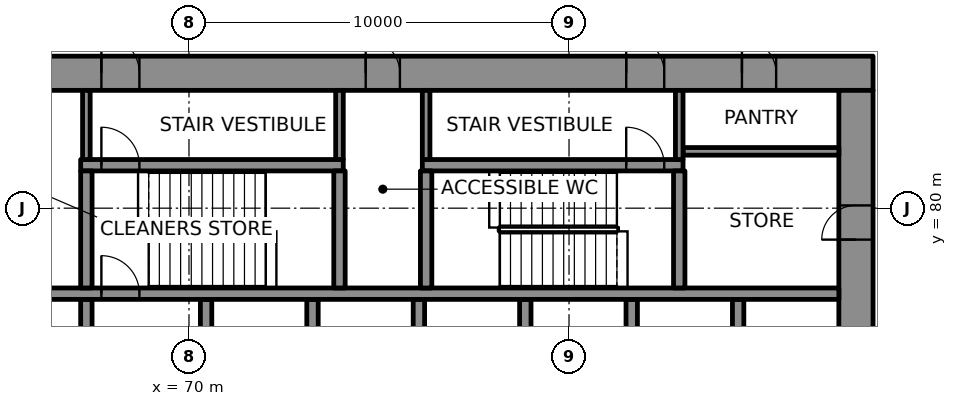
"""IFC4 building model, lengths in metres.
Left out: names, types, materials, properties, quantities, classifications, styles, units other than length and angle.
Written with IfcOpenShell. Run it as: python <this file> out.ifc"""

import sys

from ifc_helpers import new_model, si_unit, direction, frame, frame_2d, origin, place, context, subcontext, project, spatial, rectangle, extrude, element, fill, save


model = new_model("IFC4")
c1 = context("Model", 3, precision=1e-05, world=origin(), true_north=direction((0.0, 1.0)))
c2 = subcontext(c1, "Body", "Model", "MODEL_VIEW")
j1 = project(units=[si_unit("LENGTHUNIT", "METRE"), si_unit("PLANEANGLEUNIT", "RADIAN")], contexts=[c1])
p1 = place(None, origin())
s1 = spatial("IfcSite", under=j1, at=p1, CompositionType="ELEMENT")
p2 = place(p1, origin())
s2 = spatial("IfcBuilding", under=s1, at=p2, CompositionType="ELEMENT")
p3 = place(p2, frame((0.0, 0.0, 65.2)))
s3 = spatial("IfcBuildingStorey", under=s2, at=p3, CompositionType="ELEMENT", Elevation=65.2)
p4 = place(p3, frame((62.0, 83.55, 0.0), z_axis=(0.0, 0.0, 1.0), x_axis=(1.0, 0.0, 0.0)))
e1 = element("IfcWall", 1, at=p4, inside=s3, PredefinedType="SHEAR", context=c2, shape_type="SweptSolid", body=[
    extrude(rectangle(XDim=26.0, YDim=0.9, at=frame_2d((13.0, 0.0))), origin(), (0.0, 0.0, 1.0), 4.0),
])
p5 = place(p4, frame((5.695, 0.0, 0.0)))
e2 = element("IfcOpeningElement", 2, at=p5, cuts=e1, PredefinedType="OPENING", context=c2, shape_type="SweptSolid", body=[
    extrude(rectangle(XDim=1.0, YDim=2.1, at=frame_2d((0.5, 1.05))), frame((0.0, 0.46, 0.0), z_axis=(0.0, -1.0, 0.0), x_axis=(1.0, 0.0, 0.0)), (0.0, 0.0, 1.0), 0.92),
])
p6 = place(p4, frame((19.505, 0.0, 0.0)))
e3 = element("IfcOpeningElement", 3, at=p6, cuts=e1, PredefinedType="OPENING", context=c2, shape_type="SweptSolid", body=[
    extrude(rectangle(XDim=1.0, YDim=2.1, at=frame_2d((0.5, 1.05))), frame((0.0, 0.46, 0.0), z_axis=(0.0, -1.0, 0.0), x_axis=(1.0, 0.0, 0.0)), (0.0, 0.0, 1.0), 0.92),
])
p7 = place(p4, frame((3.45, 0.0, 0.0)))
e4 = element("IfcOpeningElement", 4, at=p7, cuts=e1, PredefinedType="OPENING", context=c2, shape_type="SweptSolid", body=[
    extrude(rectangle(XDim=0.9, YDim=2.1, at=frame_2d((0.45, 1.05))), frame((0.0, 0.46, 0.0), z_axis=(0.0, -1.0, 0.0), x_axis=(1.0, 0.0, 0.0)), (0.0, 0.0, 1.0), 0.92),
])
p8 = place(p4, frame((12.65, 0.0, 0.0)))
e5 = element("IfcOpeningElement", 5, at=p8, cuts=e1, PredefinedType="OPENING", context=c2, shape_type="SweptSolid", body=[
    extrude(rectangle(XDim=0.9, YDim=2.1, at=frame_2d((0.45, 1.05))), frame((0.0, 0.46, 0.0), z_axis=(0.0, -1.0, 0.0), x_axis=(1.0, 0.0, 0.0)), (0.0, 0.0, 1.0), 0.92),
])
p9 = place(p4, frame((22.55, 0.0, 0.0)))
e6 = element("IfcOpeningElement", 6, at=p9, cuts=e1, PredefinedType="OPENING", context=c2, shape_type="SweptSolid", body=[
    extrude(rectangle(XDim=0.9, YDim=2.1, at=frame_2d((0.45, 1.05))), frame((0.0, 0.46, 0.0), z_axis=(0.0, -1.0, 0.0), x_axis=(1.0, 0.0, 0.0)), (0.0, 0.0, 1.0), 0.92),
])
p10 = place(p3, frame((87.55, 66.9, 0.0), z_axis=(0.0, 0.0, 1.0), x_axis=(0.0, 1.0, 0.0)))
e7 = element("IfcWall", 7, at=p10, inside=s3, PredefinedType="SHEAR", context=c2, shape_type="SweptSolid", body=[
    extrude(rectangle(XDim=16.2, YDim=0.9, at=frame_2d((8.1, 0.0))), origin(), (0.0, 0.0, 1.0), 4.0),
])
p11 = place(p10, frame((5.5, 0.0, 0.0)))
e8 = element("IfcOpeningElement", 8, at=p11, cuts=e7, PredefinedType="OPENING", context=c2, shape_type="SweptSolid", body=[
    extrude(rectangle(XDim=1.8, YDim=2.1, at=frame_2d((0.9, 1.05))), frame((0.0, 0.46, 0.0), z_axis=(0.0, -1.0, 0.0), x_axis=(1.0, 0.0, 0.0)), (0.0, 0.0, 1.0), 0.92),
])
p12 = place(p10, frame((12.272, 0.0, 0.0)))
e9 = element("IfcOpeningElement", 9, at=p12, cuts=e7, PredefinedType="OPENING", context=c2, shape_type="SweptSolid", body=[
    extrude(rectangle(XDim=0.9, YDim=2.1, at=frame_2d((0.45, 1.05))), frame((0.0, 0.46, 0.0), z_axis=(0.0, -1.0, 0.0), x_axis=(1.0, 0.0, 0.0)), (0.0, 0.0, 1.0), 0.92),
])
p13 = place(p3, frame((67.3, 75.0, 0.0), z_axis=(0.0, 0.0, 1.0), x_axis=(0.0, 1.0, 0.0)))
e10 = element("IfcWall", 10, at=p13, inside=s3, PredefinedType="SHEAR", context=c2, shape_type="SweptSolid", body=[
    extrude(rectangle(XDim=2.6, YDim=0.3, at=frame_2d((1.3, 0.0))), origin(), (0.0, 0.0, 1.0), 4.0),
])
p14 = place(p3, frame((70.45, 75.0, 0.0), z_axis=(0.0, 0.0, 1.0), x_axis=(0.0, 1.0, 0.0)))
e11 = element("IfcWall", 11, at=p14, inside=s3, PredefinedType="SHEAR", context=c2, shape_type="SweptSolid", body=[
    extrude(rectangle(XDim=2.6, YDim=0.3, at=frame_2d((1.3, 0.0))), origin(), (0.0, 0.0, 1.0), 4.0),
])
p15 = place(p14, frame((0.15, 0.0, 0.0)))
e12 = element("IfcOpeningElement", 12, at=p15, cuts=e11, PredefinedType="OPENING", context=c2, shape_type="SweptSolid", body=[
    extrude(rectangle(XDim=1.1, YDim=2.1, at=frame_2d((0.55, 1.05))), frame((0.0, 0.16, 0.0), z_axis=(0.0, -1.0, 0.0), x_axis=(1.0, 0.0, 0.0)), (0.0, 0.0, 1.0), 0.32),
])
for number, where, z_axis, x_axis in (
    (13, (73.25, 75.0, 0.0), (0.0, 0.0, 1.0), (0.0, 1.0, 0.0)),
    (14, (76.05, 75.0, 0.0), (0.0, 0.0, 1.0), (0.0, 1.0, 0.0)),
    (15, (78.85, 75.0, 0.0), (0.0, 0.0, 1.0), (0.0, 1.0, 0.0)),
    (16, (81.65, 75.0, 0.0), (0.0, 0.0, 1.0), (0.0, 1.0, 0.0)),
    (17, (84.45, 75.0, 0.0), (0.0, 0.0, 1.0), (0.0, 1.0, 0.0)),
):
    element("IfcWall", number, at=place(p3, frame(where, z_axis=z_axis, x_axis=x_axis)), inside=s3, PredefinedType="SHEAR", context=c2, shape_type="SweptSolid", body=[
        extrude(rectangle(XDim=2.6, YDim=0.3, at=frame_2d((1.3, 0.0))), origin(), (0.0, 0.0, 1.0), 4.0),
    ])
p16 = place(p3, frame((64.35, 77.75, 0.0), z_axis=(0.0, 0.0, 1.0), x_axis=(1.0, 0.0, 0.0)))
e18 = element("IfcWall", 18, at=p16, inside=s3, PredefinedType="SHEAR", context=c2, shape_type="SweptSolid", body=[
    extrude(rectangle(XDim=22.75, YDim=0.3, at=frame_2d((11.375, 0.0))), origin(), (0.0, 0.0, 1.0), 4.0),
])
p17 = place(p16, frame((3.345, 0.0, 0.0)))
e19 = element("IfcOpeningElement", 19, at=p17, cuts=e18, PredefinedType="OPENING", context=c2, shape_type="SweptSolid", body=[
    extrude(rectangle(XDim=1.0, YDim=2.1, at=frame_2d((0.5, 1.05))), frame((0.0, 0.16, 0.0), z_axis=(0.0, -1.0, 0.0), x_axis=(1.0, 0.0, 0.0)), (0.0, 0.0, 1.0), 0.32),
])
p18 = place(p3, frame((67.15, 81.13, 0.0), z_axis=(0.0, 0.0, 1.0), x_axis=(1.0, 0.0, 0.0)))
e20 = element("IfcWall", 20, at=p18, inside=s3, PredefinedType="SHEAR", context=c2, shape_type="SweptSolid", body=[
    extrude(rectangle(XDim=6.91, YDim=0.3, at=frame_2d((3.455, 0.0))), origin(), (0.0, 0.0, 1.0), 4.0),
])
p19 = place(p18, frame((0.545, 0.0, 0.0)))
e21 = element("IfcOpeningElement", 21, at=p19, cuts=e20, PredefinedType="OPENING", context=c2, shape_type="SweptSolid", body=[
    extrude(rectangle(XDim=1.0, YDim=2.1, at=frame_2d((0.5, 1.05))), frame((0.0, 0.16, 0.0), z_axis=(0.0, -1.0, 0.0), x_axis=(1.0, 0.0, 0.0)), (0.0, 0.0, 1.0), 0.32),
])
p20 = place(p3, frame((76.14, 81.13, 0.0), z_axis=(0.0, 0.0, 1.0), x_axis=(1.0, 0.0, 0.0)))
e22 = element("IfcWall", 22, at=p20, inside=s3, PredefinedType="SHEAR", context=c2, shape_type="SweptSolid", body=[
    extrude(rectangle(XDim=6.86, YDim=0.3, at=frame_2d((3.43, 0.0))), origin(), (0.0, 0.0, 1.0), 4.0),
])
p21 = place(p20, frame((5.365, 0.0, 0.0)))
e23 = element("IfcOpeningElement", 23, at=p21, cuts=e22, PredefinedType="OPENING", context=c2, shape_type="SweptSolid", body=[
    extrude(rectangle(XDim=1.0, YDim=2.1, at=frame_2d((0.5, 1.05))), frame((0.0, 0.16, 0.0), z_axis=(0.0, -1.0, 0.0), x_axis=(1.0, 0.0, 0.0)), (0.0, 0.0, 1.0), 0.32),
])
for number, where, z_axis, x_axis in (
    (24, (67.3, 77.9, 0.0), (0.0, 0.0, 1.0), (0.0, 1.0, 0.0)),
    (25, (73.96, 77.9, 0.0), (0.0, 0.0, 1.0), (0.0, 1.0, 0.0)),
    (26, (76.24, 77.9, 0.0), (0.0, 0.0, 1.0), (0.0, 1.0, 0.0)),
    (27, (82.9, 77.9, 0.0), (0.0, 0.0, 1.0), (0.0, 1.0, 0.0)),
):
    element("IfcWall", number, at=place(p3, frame(where, z_axis=z_axis, x_axis=x_axis)), inside=s3, PredefinedType="SHEAR", context=c2, shape_type="SweptSolid", body=[
        extrude(rectangle(XDim=3.08, YDim=0.3, at=frame_2d((1.54, 0.0))), origin(), (0.0, 0.0, 1.0), 4.0),
    ])
p22 = place(p3, frame((83.0, 81.495, 0.0), z_axis=(0.0, 0.0, 1.0), x_axis=(1.0, 0.0, 0.0)))
e28 = element("IfcWall", 28, at=p22, inside=s3, PredefinedType="PARTITIONING", context=c2, shape_type="SweptSolid", body=[
    extrude(rectangle(XDim=4.1, YDim=0.2, at=frame_2d((2.05, 0.0))), origin(), (0.0, 0.0, 1.0), 4.0),
])
for number, where, z_axis, x_axis in (
    (29, (67.3, 81.28, 0.0), (0.0, 0.0, 1.0), (0.0, 1.0, 0.0)),
    (30, (73.96, 81.28, 0.0), (0.0, 0.0, 1.0), (0.0, 1.0, 0.0)),
    (31, (76.24, 81.28, 0.0), (0.0, 0.0, 1.0), (0.0, 1.0, 0.0)),
    (32, (82.9, 81.28, 0.0), (0.0, 0.0, 1.0), (0.0, 1.0, 0.0)),
):
    element("IfcWall", number, at=place(p3, frame(where, z_axis=z_axis, x_axis=x_axis)), inside=s3, PredefinedType="PARTITIONING", context=c2, shape_type="SweptSolid", body=[
        extrude(rectangle(XDim=1.82, YDim=0.2, at=frame_2d((0.91, 0.0))), origin(), (0.0, 0.0, 1.0), 4.0),
    ])
p23 = place(p17, origin())
e33 = element("IfcDoor", 33, at=p23, inside=s3, OperationType="SINGLE_SWING_LEFT", PredefinedType="DOOR", context=c2, shape_type="SweptSolid", body=[
    extrude(rectangle(XDim=1.0, YDim=2.1, at=frame_2d((0.5, 1.05))), frame((0.0, 0.025, 0.0), z_axis=(0.0, -1.0, 0.0), x_axis=(1.0, 0.0, 0.0)), (0.0, 0.0, 1.0), 0.05),
])
fill(e19, e33)
p24 = place(p19, origin())
e34 = element("IfcDoor", 34, at=p24, inside=s3, OperationType="SINGLE_SWING_RIGHT", PredefinedType="DOOR", context=c2, shape_type="SweptSolid", body=[
    extrude(rectangle(XDim=1.0, YDim=2.1, at=frame_2d((0.5, 1.05))), frame((0.0, 0.025, 0.0), z_axis=(0.0, -1.0, 0.0), x_axis=(1.0, 0.0, 0.0)), (0.0, 0.0, 1.0), 0.05),
])
fill(e21, e34)
p25 = place(p5, origin())
e35 = element("IfcDoor", 35, at=p25, inside=s3, OperationType="SINGLE_SWING_LEFT", PredefinedType="DOOR", context=c2, shape_type="SweptSolid", body=[
    extrude(rectangle(XDim=1.0, YDim=2.1, at=frame_2d((0.5, 1.05))), frame((0.0, 0.17, 0.0), z_axis=(0.0, -1.0, 0.0), x_axis=(1.0, 0.0, 0.0)), (0.0, 0.0, 1.0), 0.34),
])
fill(e2, e35)
p26 = place(p21, origin())
e36 = element("IfcDoor", 36, at=p26, inside=s3, OperationType="SINGLE_SWING_RIGHT", PredefinedType="DOOR", context=c2, shape_type="SweptSolid", body=[
    extrude(rectangle(XDim=1.0, YDim=2.1, at=frame_2d((0.5, 1.05))), frame((0.0, 0.025, 0.0), z_axis=(0.0, -1.0, 0.0), x_axis=(1.0, 0.0, 0.0)), (0.0, 0.0, 1.0), 0.05),
])
fill(e23, e36)
p27 = place(p6, origin())
e37 = element("IfcDoor", 37, at=p27, inside=s3, OperationType="SINGLE_SWING_LEFT", PredefinedType="DOOR", context=c2, shape_type="SweptSolid", body=[
    extrude(rectangle(XDim=1.0, YDim=2.1, at=frame_2d((0.5, 1.05))), frame((0.0, 0.17, 0.0), z_axis=(0.0, -1.0, 0.0), x_axis=(1.0, 0.0, 0.0)), (0.0, 0.0, 1.0), 0.34),
])
fill(e3, e37)
p28 = place(p8, origin())
e38 = element("IfcDoor", 38, at=p28, inside=s3, OperationType="SINGLE_SWING_LEFT", PredefinedType="DOOR", context=c2, shape_type="SweptSolid", body=[
    extrude(rectangle(XDim=0.9, YDim=2.1, at=frame_2d((0.45, 1.05))), frame((0.0, 0.17, 0.0), z_axis=(0.0, -1.0, 0.0), x_axis=(1.0, 0.0, 0.0)), (0.0, 0.0, 1.0), 0.34),
])
fill(e5, e38)
p29 = place(p12, origin())
e39 = element("IfcDoor", 39, at=p29, inside=s3, OperationType="SINGLE_SWING_RIGHT", PredefinedType="DOOR", context=c2, shape_type="SweptSolid", body=[
    extrude(rectangle(XDim=0.9, YDim=2.1, at=frame_2d((0.45, 1.05))), frame((0.0, 0.17, 0.0), z_axis=(0.0, -1.0, 0.0), x_axis=(1.0, 0.0, 0.0)), (0.0, 0.0, 1.0), 0.34),
])
fill(e9, e39)
p30 = place(p9, origin())
e40 = element("IfcDoor", 40, at=p30, inside=s3, OperationType="SINGLE_SWING_LEFT", PredefinedType="DOOR", context=c2, shape_type="SweptSolid", body=[
    extrude(rectangle(XDim=0.9, YDim=2.1, at=frame_2d((0.45, 1.05))), frame((0.0, 0.17, 0.0), z_axis=(0.0, -1.0, 0.0), x_axis=(1.0, 0.0, 0.0)), (0.0, 0.0, 1.0), 0.34),
])
fill(e6, e40)
save(model, sys.argv[1])
